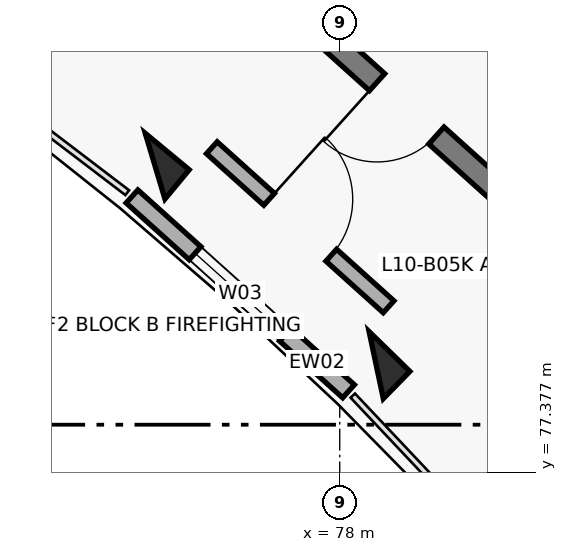
"""IFC4 building model, lengths in metres.
Left out: names, types, materials, properties, quantities, classifications, styles, units other than length and angle.
Written with IfcOpenShell. Run it as: python <this file> out.ifc"""

import sys

from ifc_helpers import new_model, si_unit, direction, frame, frame_2d, origin, origin_2d, place, context, subcontext, project, spatial, rectangle, extrude, element, fill, save


model = new_model("IFC4")
c1 = context("Model", 3, precision=1e-05, world=origin(), true_north=direction((0.0, 1.0)))
c2 = subcontext(c1, "Body", "Model", "MODEL_VIEW")
j1 = project(units=[si_unit("LENGTHUNIT", "METRE"), si_unit("PLANEANGLEUNIT", "RADIAN")], contexts=[c1])
p1 = place(None, origin())
s1 = spatial("IfcSite", under=j1, at=p1, CompositionType="ELEMENT")
p2 = place(p1, origin())
s2 = spatial("IfcBuilding", under=s1, at=p2, CompositionType="ELEMENT")
p3 = place(p2, frame((0.0, 0.0, 32.9)))
s3 = spatial("IfcBuildingStorey", under=s2, at=p3, CompositionType="ELEMENT", Elevation=32.9)
for number, where, z_axis, x_axis in (
    (1, (75.571, 81.402, 0.0), (0.0, 0.0, 1.0), (0.638, 0.77, 0.0)),
    (2, (78.48, 78.784, 0.0), (0.0, 0.0, 1.0), (0.699, 0.715, 0.0)),
):
    element("IfcColumn", number, at=place(p3, frame(where, z_axis=z_axis, x_axis=x_axis)), inside=s3, PredefinedType="COLUMN", context=c2, shape_type="SweptSolid", body=[
        extrude(rectangle(XDim=0.5, YDim=0.75, at=origin_2d()), origin(), (0.0, 0.0, 1.0), 3.1),
    ])
p4 = place(p3, frame((75.267, 81.003, 0.0), z_axis=(0.0, 0.0, 1.0), x_axis=(0.743363835609, -0.668887290886, 0.0)))
e3 = element("IfcWall", 3, at=p4, inside=s3, PredefinedType="SOLIDWALL", context=c2, shape_type="SweptSolid", body=[
    extrude(rectangle(XDim=3.832, YDim=0.23, at=frame_2d((1.916, 0.0))), origin(), (0.0, 0.0, 1.0), 2.25),
])
p5 = place(p4, frame((1.116, 0.0, 0.32)))
e4 = element("IfcOpeningElement", 4, at=p5, cuts=e3, PredefinedType="OPENING", context=c2, shape_type="SweptSolid", body=[
    extrude(rectangle(XDim=1.6, YDim=1.5, at=frame_2d((0.8, 0.75))), frame((0.0, 0.125, 0.0), z_axis=(0.0, -1.0, 0.0), x_axis=(1.0, 0.0, 0.0)), (0.0, 0.0, 1.0), 0.25),
])
p6 = place(p3, frame((80.32, 80.862, 0.0), z_axis=(0.0, 0.0, 1.0), x_axis=(-0.743375696158, 0.668874109501, 0.0)))
e5 = element("IfcWall", 5, at=p6, inside=s3, PredefinedType="SHEAR", context=c2, shape_type="SweptSolid", body=[
    extrude(rectangle(XDim=3.87, YDim=0.3, at=frame_2d((1.935, 0.0))), origin(), (0.0, 0.0, 1.0), 3.1),
])
p7 = place(p6, frame((1.41, 0.0, 0.0)))
e6 = element("IfcOpeningElement", 6, at=p7, cuts=e5, PredefinedType="OPENING", context=c2, shape_type="SweptSolid", body=[
    extrude(rectangle(XDim=1.05, YDim=2.15, at=frame_2d((0.525, 1.075))), frame((0.0, 0.16, 0.0), z_axis=(0.0, -1.0, 0.0), x_axis=(1.0, 0.0, 0.0)), (0.0, 0.0, 1.0), 0.32),
])
p8 = place(p3, frame((76.317, 81.644, 0.0), z_axis=(0.0, 0.0, 1.0), x_axis=(0.743387266925, -0.668861249718, 0.0)))
e7 = element("IfcWall", 7, at=p8, inside=s3, PredefinedType="SOLIDWALL", context=c2, shape_type="SweptSolid", body=[
    extrude(rectangle(XDim=3.128, YDim=0.21, at=frame_2d((1.564, 0.0))), origin(), (0.0, 0.0, 1.0), 2.08),
])
p9 = place(p8, frame((1.014, 0.0, 0.0)))
e8 = element("IfcOpeningElement", 8, at=p9, cuts=e7, PredefinedType="OPENING", context=c2, shape_type="SweptSolid", body=[
    extrude(rectangle(XDim=1.1, YDim=2.15, at=frame_2d((0.55, 1.075))), frame((0.0, 0.115, 0.0), z_axis=(0.0, -1.0, 0.0), x_axis=(1.0, 0.0, 0.0)), (0.0, 0.0, 1.0), 0.23),
])
p10 = place(p5, origin())
e9 = element("IfcWindow", 9, at=p10, inside=s3, PartitioningType="DOUBLE_PANEL_VERTICAL", PredefinedType="WINDOW", context=c2, shape_type="SweptSolid", body=[
    extrude(rectangle(XDim=1.6, YDim=1.5, at=frame_2d((0.8, 0.75))), frame((0.0, 0.03, 0.0), z_axis=(0.0, -1.0, 0.0), x_axis=(1.0, 0.0, 0.0)), (0.0, 0.0, 1.0), 0.06),
])
fill(e4, e9)
p11 = place(p7, origin())
e10 = element("IfcDoor", 10, at=p11, inside=s3, OperationType="SINGLE_SWING_RIGHT", PredefinedType="DOOR", context=c2, shape_type="SweptSolid", body=[
    extrude(rectangle(XDim=1.05, YDim=2.15, at=frame_2d((0.525, 1.075))), frame((0.0, 0.025, 0.0), z_axis=(0.0, -1.0, 0.0), x_axis=(1.0, 0.0, 0.0)), (0.0, 0.0, 1.0), 0.05),
])
fill(e6, e10)
p12 = place(p9, origin())
e11 = element("IfcDoor", 11, at=p12, inside=s3, OperationType="SINGLE_SWING_LEFT", PredefinedType="DOOR", context=c2, shape_type="SweptSolid", body=[
    extrude(rectangle(XDim=1.1, YDim=2.15, at=frame_2d((0.55, 1.075))), frame((0.0, 0.025, 0.0), z_axis=(0.0, -1.0, 0.0), x_axis=(1.0, 0.0, 0.0)), (0.0, 0.0, 1.0), 0.05),
])
fill(e8, e11)
save(model, sys.argv[1])
